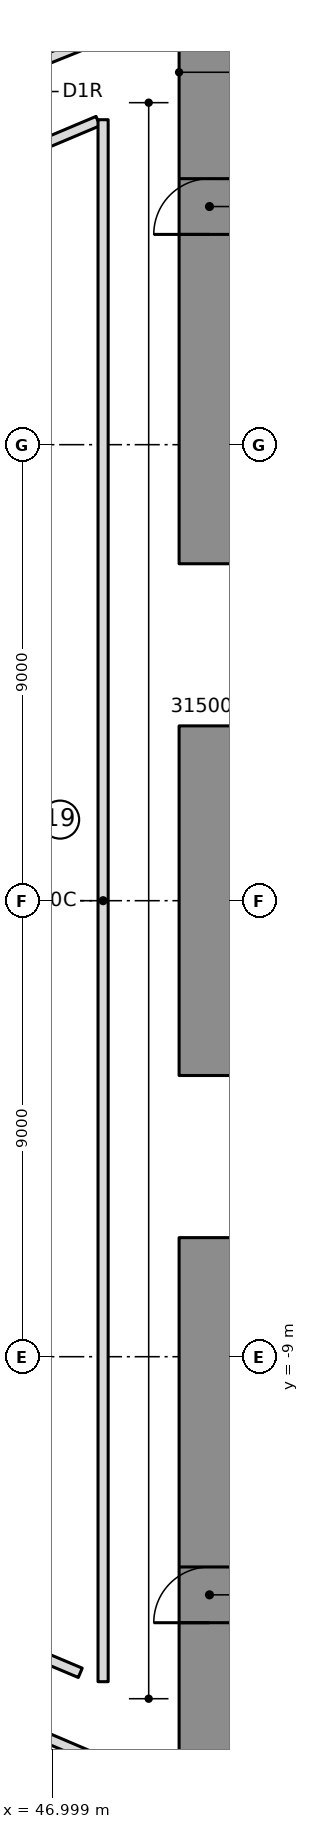
"""IFC4 building model, lengths in metres.
Left out: names, types, materials, properties, quantities, classifications, styles, units other than length and angle.
Written with IfcOpenShell. Run it as: python <this file> out.ifc"""

import sys

from ifc_helpers import new_model, si_unit, direction, frame, frame_2d, origin, place, context, subcontext, project, spatial, rectangle, extrude, element, fill, save


model = new_model("IFC4")
c1 = context("Model", 3, precision=1e-05, world=origin(), true_north=direction((0.0, 1.0)))
c2 = subcontext(c1, "Body", "Model", "MODEL_VIEW")
j1 = project(units=[si_unit("LENGTHUNIT", "METRE"), si_unit("PLANEANGLEUNIT", "RADIAN")], contexts=[c1])
p1 = place(None, origin())
s1 = spatial("IfcSite", under=j1, at=p1, CompositionType="ELEMENT")
p2 = place(p1, origin())
s2 = spatial("IfcBuilding", under=s1, at=p2, CompositionType="ELEMENT")
p3 = place(p2, frame((0.0, 0.0, 39.6)))
s3 = spatial("IfcBuildingStorey", under=s2, at=p3, CompositionType="ELEMENT", Elevation=39.6)
p4 = place(p3, frame((50.1, 6.65, 0.0), z_axis=(0.0, 0.0, 1.0), x_axis=(0.0, 1.0, 0.0)))
e1 = element("IfcWall", 1, at=p4, inside=s3, PredefinedType="SHEAR", context=c2, shape_type="SweptSolid", body=[
    extrude(rectangle(XDim=10.3, YDim=1.2, at=frame_2d((5.15, 0.0))), origin(), (0.0, 0.0, 1.0), 3.55),
])
p5 = place(p4, frame((6.5, 0.0, 0.0)))
e2 = element("IfcOpeningElement", 2, at=p5, cuts=e1, PredefinedType="OPENING", context=c2, shape_type="SweptSolid", body=[
    extrude(rectangle(XDim=1.1, YDim=2.1, at=frame_2d((0.55, 1.05))), frame((0.0, 0.61, 0.0), z_axis=(0.0, -1.0, 0.0), x_axis=(1.0, 0.0, 0.0)), (0.0, 0.0, 1.0), 1.22),
])
p6 = place(p3, frame((50.1, -3.45, 0.0), z_axis=(0.0, 0.0, 1.0), x_axis=(0.0, 1.0, 0.0)))
e3 = element("IfcWall", 3, at=p6, inside=s3, PredefinedType="SHEAR", context=c2, shape_type="SweptSolid", body=[
    extrude(rectangle(XDim=6.9, YDim=1.2, at=frame_2d((3.45, 0.0))), origin(), (0.0, 0.0, 1.0), 3.55),
])
p7 = place(p3, frame((50.1, -16.95, 0.0), z_axis=(0.0, 0.0, 1.0), x_axis=(0.0, 1.0, 0.0)))
e4 = element("IfcWall", 4, at=p7, inside=s3, PredefinedType="SHEAR", context=c2, shape_type="SweptSolid", body=[
    extrude(rectangle(XDim=10.3, YDim=1.2, at=frame_2d((5.15, 0.0))), origin(), (0.0, 0.0, 1.0), 3.55),
])
p8 = place(p7, frame((2.7, 0.0, 0.0)))
e5 = element("IfcOpeningElement", 5, at=p8, cuts=e4, PredefinedType="OPENING", context=c2, shape_type="SweptSolid", body=[
    extrude(rectangle(XDim=1.1, YDim=2.1, at=frame_2d((0.55, 1.05))), frame((0.0, 0.61, 0.0), z_axis=(0.0, -1.0, 0.0), x_axis=(1.0, 0.0, 0.0)), (0.0, 0.0, 1.0), 1.22),
])
p9 = place(p3, frame((43.85, 13.677, 0.0), z_axis=(0.0, 0.0, 1.0), x_axis=(0.921265924084, 0.388933281068, 0.0)))
e6 = element("IfcWall", 6, at=p9, inside=s3, PredefinedType="PARTITIONING", context=c2, shape_type="SweptSolid", body=[
    extrude(rectangle(XDim=4.396, YDim=0.2, at=frame_2d((2.198, 0.0))), origin(), (0.0, 0.0, 1.0), 3.25),
])
p10 = place(p9, frame((1.508, 0.0, 0.0)))
e7 = element("IfcOpeningElement", 7, at=p10, cuts=e6, PredefinedType="OPENING", context=c2, shape_type="SweptSolid", body=[
    extrude(rectangle(XDim=1.0, YDim=2.1, at=frame_2d((0.5, 1.05))), frame((0.0, 0.11, 0.0), z_axis=(0.0, -1.0, 0.0), x_axis=(1.0, 0.0, 0.0)), (0.0, 0.0, 1.0), 0.22),
])
p11 = place(p3, frame((47.55, -15.239, 0.0), z_axis=(0.0, 0.0, 1.0), x_axis=(-0.921269894054, 0.388923877269, 0.0)))
e8 = element("IfcWall", 8, at=p11, inside=s3, PredefinedType="PARTITIONING", context=c2, shape_type="SweptSolid", body=[
    extrude(rectangle(XDim=4.016, YDim=0.2, at=frame_2d((2.008, 0.0))), origin(), (0.0, 0.0, 1.0), 3.25),
])
p12 = place(p3, frame((47.704, 16.936, 0.0), z_axis=(0.0, 0.0, 1.0), x_axis=(-0.927985537407, -0.372616213232, 0.0)))
e9 = element("IfcWall", 9, at=p12, inside=s3, PredefinedType="PARTITIONING", context=c2, shape_type="SweptSolid", body=[
    extrude(rectangle(XDim=0.927, YDim=0.2, at=frame_2d((0.463, 0.0))), origin(), (0.0, 0.0, 1.0), 3.25),
])
p13 = place(p3, frame((38.585, -12.981, 0.0), z_axis=(0.0, 0.0, 1.0), x_axis=(0.919847962482, -0.392275064103, 0.0)))
e10 = element("IfcWall", 10, at=p13, inside=s3, PredefinedType="PARTITIONING", context=c2, shape_type="SweptSolid", body=[
    extrude(rectangle(XDim=9.914, YDim=0.2, at=frame_2d((4.957, 0.0))), origin(), (0.0, 0.0, 1.0), 3.25),
])
p14 = place(p13, frame((3.05, 0.0, 0.0)))
e11 = element("IfcOpeningElement", 11, at=p14, cuts=e10, PredefinedType="OPENING", context=c2, shape_type="SweptSolid", body=[
    extrude(rectangle(XDim=1.5, YDim=2.1, at=frame_2d((0.75, 1.05))), frame((0.0, 0.11, 0.0), z_axis=(0.0, -1.0, 0.0), x_axis=(1.0, 0.0, 0.0)), (0.0, 0.0, 1.0), 0.22),
])
p15 = place(p3, frame((48.0, 15.414, 0.0), z_axis=(0.0, 0.0, 1.0), x_axis=(0.0, -1.0, 0.0)))
e12 = element("IfcWall", 12, at=p15, inside=s3, PredefinedType="PARTITIONING", context=c2, shape_type="SweptSolid", body=[
    extrude(rectangle(XDim=30.828, YDim=0.2, at=frame_2d((15.414, 0.0))), origin(), (0.0, 0.0, 1.0), 3.25),
])
p16 = place(p5, origin())
e13 = element("IfcDoor", 13, at=p16, inside=s3, OperationType="SINGLE_SWING_RIGHT", PredefinedType="DOOR", context=c2, shape_type="SweptSolid", body=[
    extrude(rectangle(XDim=1.1, YDim=2.1, at=frame_2d((0.55, 1.05))), frame((0.0, 0.025, 0.0), z_axis=(0.0, -1.0, 0.0), x_axis=(1.0, 0.0, 0.0)), (0.0, 0.0, 1.0), 0.05),
])
fill(e2, e13)
p17 = place(p8, origin())
e14 = element("IfcDoor", 14, at=p17, inside=s3, OperationType="SINGLE_SWING_RIGHT", PredefinedType="DOOR", context=c2, shape_type="SweptSolid", body=[
    extrude(rectangle(XDim=1.1, YDim=2.1, at=frame_2d((0.55, 1.05))), frame((0.0, 0.025, 0.0), z_axis=(0.0, -1.0, 0.0), x_axis=(1.0, 0.0, 0.0)), (0.0, 0.0, 1.0), 0.05),
])
fill(e5, e14)
save(model, sys.argv[1])
